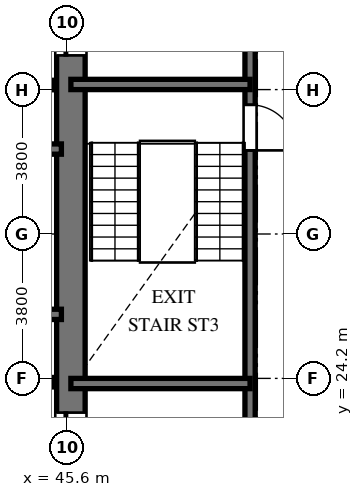
"""IFC4 building model, lengths in metres.
Left out: names, types, materials, properties, quantities, classifications, styles, units other than length and angle.
Written with IfcOpenShell. Run it as: python <this file> out.ifc"""

import sys

from ifc_helpers import new_model, si_unit, direction, frame, frame_2d, origin, place, context, subcontext, project, spatial, rectangle, extrude, element, fill, save


model = new_model("IFC4")
c1 = context("Model", 3, precision=1e-05, world=origin(), true_north=direction((0.0, 1.0)))
c2 = subcontext(c1, "Body", "Model", "MODEL_VIEW")
j1 = project(units=[si_unit("LENGTHUNIT", "METRE"), si_unit("PLANEANGLEUNIT", "RADIAN")], contexts=[c1])
p1 = place(None, origin())
s1 = spatial("IfcSite", under=j1, at=p1, CompositionType="ELEMENT")
p2 = place(p1, origin())
s2 = spatial("IfcBuilding", under=s1, at=p2, CompositionType="ELEMENT")
p3 = place(p2, frame((0.0, 0.0, 99.984)))
s3 = spatial("IfcBuildingStorey", under=s2, at=p3, CompositionType="ELEMENT", Elevation=99.984)
p4 = place(p3, frame((45.7, 20.95, 0.0), z_axis=(0.0, 0.0, 1.0), x_axis=(0.0, 1.0, 0.0)))
e1 = element("IfcWall", 1, at=p4, inside=s3, PredefinedType="SHEAR", context=c2, shape_type="SweptSolid", body=[
    extrude(rectangle(XDim=14.1, YDim=0.75, at=frame_2d((7.05, 0.0))), origin(), (0.0, 0.0, 1.0), 3.648),
])
p5 = place(p4, frame((11.75, 0.0, 0.0)))
e2 = element("IfcOpeningElement", 2, at=p5, cuts=e1, PredefinedType="OPENING", context=c2, shape_type="SweptSolid", body=[
    extrude(rectangle(XDim=1.4, YDim=2.3, at=frame_2d((0.7, 1.15))), frame((0.0, 0.385, 0.0), z_axis=(0.0, -1.0, 0.0), x_axis=(1.0, 0.0, 0.0)), (0.0, 0.0, 1.0), 0.77),
])
p6 = place(p4, frame((0.95, 0.0, 0.0)))
e3 = element("IfcOpeningElement", 3, at=p6, cuts=e1, PredefinedType="OPENING", context=c2, shape_type="SweptSolid", body=[
    extrude(rectangle(XDim=1.4, YDim=2.3, at=frame_2d((0.7, 1.15))), frame((0.0, 0.385, 0.0), z_axis=(0.0, -1.0, 0.0), x_axis=(1.0, 0.0, 0.0)), (0.0, 0.0, 1.0), 0.77),
])
p7 = place(p3, frame((37.465, 30.235, 0.0), z_axis=(0.0, 0.0, 1.0), x_axis=(1.0, 0.0, 0.0)))
e4 = element("IfcWall", 4, at=p7, inside=s3, PredefinedType="SHEAR", context=c2, shape_type="SweptSolid", body=[
    extrude(rectangle(XDim=7.985, YDim=0.27, at=frame_2d((3.992, 0.0))), origin(), (0.0, 0.0, 1.0), 3.648),
])
p8 = place(p7, frame((6.455, 0.0, 0.0)))
e5 = element("IfcOpeningElement", 5, at=p8, cuts=e4, PredefinedType="OPENING", context=c2, shape_type="SweptSolid", body=[
    extrude(rectangle(XDim=1.2, YDim=2.15, at=frame_2d((0.6, 1.075))), frame((0.0, 0.145, 0.0), z_axis=(0.0, -1.0, 0.0), x_axis=(1.0, 0.0, 0.0)), (0.0, 0.0, 1.0), 0.29),
])
p9 = place(p3, frame((37.465, 25.885, 0.0), z_axis=(0.0, 0.0, 1.0), x_axis=(1.0, 0.0, 0.0)))
e6 = element("IfcWall", 6, at=p9, inside=s3, PredefinedType="SHEAR", context=c2, shape_type="SweptSolid", body=[
    extrude(rectangle(XDim=7.985, YDim=0.27, at=frame_2d((3.992, 0.0))), origin(), (0.0, 0.0, 1.0), 3.648),
])
for number, where, z_axis, x_axis in (
    (7, (42.95, 31.92, 0.0), (0.0, 0.0, 1.0), (1.0, 0.0, 0.0)),
    (8, (42.95, 24.1, 0.0), (0.0, 0.0, 1.0), (1.0, 0.0, 0.0)),
):
    element("IfcWall", number, at=place(p3, frame(where, z_axis=z_axis, x_axis=x_axis)), inside=s3, PredefinedType="SOLIDWALL", context=c2, shape_type="SweptSolid", body=[
        extrude(rectangle(XDim=2.3, YDim=0.25, at=frame_2d((1.15, 0.0))), origin(), (0.0, 0.0, 1.0), 3.428),
    ])
p10 = place(p3, frame((50.415, 35.845, 0.0), z_axis=(0.0, 0.0, 1.0), x_axis=(0.0, -1.0, 0.0)))
e9 = element("IfcWall", 9, at=p10, inside=s3, PredefinedType="SHEAR", context=c2, shape_type="SweptSolid", body=[
    extrude(rectangle(XDim=15.825, YDim=0.27, at=frame_2d((7.913, 0.0))), origin(), (0.0, 0.0, 1.0), 3.648),
])
p11 = place(p10, frame((4.445, 0.0, 0.0)))
e10 = element("IfcOpeningElement", 10, at=p11, cuts=e9, PredefinedType="OPENING", context=c2, shape_type="SweptSolid", body=[
    extrude(rectangle(XDim=1.2, YDim=2.15, at=frame_2d((0.6, 1.075))), frame((0.0, 0.145, 0.0), z_axis=(0.0, -1.0, 0.0), x_axis=(1.0, 0.0, 0.0)), (0.0, 0.0, 1.0), 0.29),
])
p12 = place(p10, frame((1.295, 0.0, 0.0)))
e11 = element("IfcOpeningElement", 11, at=p12, cuts=e9, PredefinedType="OPENING", context=c2, shape_type="SweptSolid", body=[
    extrude(rectangle(XDim=1.3, YDim=2.2, at=frame_2d((0.65, 1.1))), frame((0.0, 0.145, 0.0), z_axis=(0.0, -1.0, 0.0), x_axis=(1.0, 0.0, 0.0)), (0.0, 0.0, 1.0), 0.29),
])
p13 = place(p10, frame((13.095, 0.0, 0.0)))
e12 = element("IfcOpeningElement", 12, at=p13, cuts=e9, PredefinedType="OPENING", context=c2, shape_type="SweptSolid", body=[
    extrude(rectangle(XDim=1.3, YDim=2.2, at=frame_2d((0.65, 1.1))), frame((0.0, 0.145, 0.0), z_axis=(0.0, -1.0, 0.0), x_axis=(1.0, 0.0, 0.0)), (0.0, 0.0, 1.0), 0.29),
])
for number, where, z_axis, x_axis in (
    (13, (45.7, 31.935, 0.0), (0.0, 0.0, 1.0), (1.0, 0.0, 0.0)),
    (14, (45.7, 24.065, 0.0), (0.0, 0.0, 1.0), (1.0, 0.0, 0.0)),
):
    element("IfcWall", number, at=place(p3, frame(where, z_axis=z_axis, x_axis=x_axis)), inside=s3, PredefinedType="SHEAR", context=c2, shape_type="SweptSolid", body=[
        extrude(rectangle(XDim=4.715, YDim=0.27, at=frame_2d((2.357, 0.0))), origin(), (0.0, 0.0, 1.0), 3.648),
    ])
p14 = place(p5, origin())
e15 = element("IfcDoor", 15, at=p14, inside=s3, OperationType="SLIDING_TO_LEFT", PredefinedType="DOOR", context=c2, shape_type="SweptSolid", body=[
    extrude(rectangle(XDim=1.4, YDim=2.3, at=frame_2d((0.7, 1.15))), frame((0.0, 0.025, 0.0), z_axis=(0.0, -1.0, 0.0), x_axis=(1.0, 0.0, 0.0)), (0.0, 0.0, 1.0), 0.05),
])
fill(e2, e15)
p15 = place(p6, origin())
e16 = element("IfcDoor", 16, at=p15, inside=s3, OperationType="SLIDING_TO_LEFT", PredefinedType="DOOR", context=c2, shape_type="SweptSolid", body=[
    extrude(rectangle(XDim=1.4, YDim=2.3, at=frame_2d((0.7, 1.15))), frame((0.0, 0.025, 0.0), z_axis=(0.0, -1.0, 0.0), x_axis=(1.0, 0.0, 0.0)), (0.0, 0.0, 1.0), 0.05),
])
fill(e3, e16)
p16 = place(p11, origin())
e17 = element("IfcDoor", 17, at=p16, inside=s3, OperationType="SINGLE_SWING_RIGHT", PredefinedType="DOOR", context=c2, shape_type="SweptSolid", body=[
    extrude(rectangle(XDim=1.2, YDim=2.15, at=frame_2d((0.6, 1.075))), frame((0.0, 0.025, 0.0), z_axis=(0.0, -1.0, 0.0), x_axis=(1.0, 0.0, 0.0)), (0.0, 0.0, 1.0), 0.05),
])
fill(e10, e17)
save(model, sys.argv[1])
